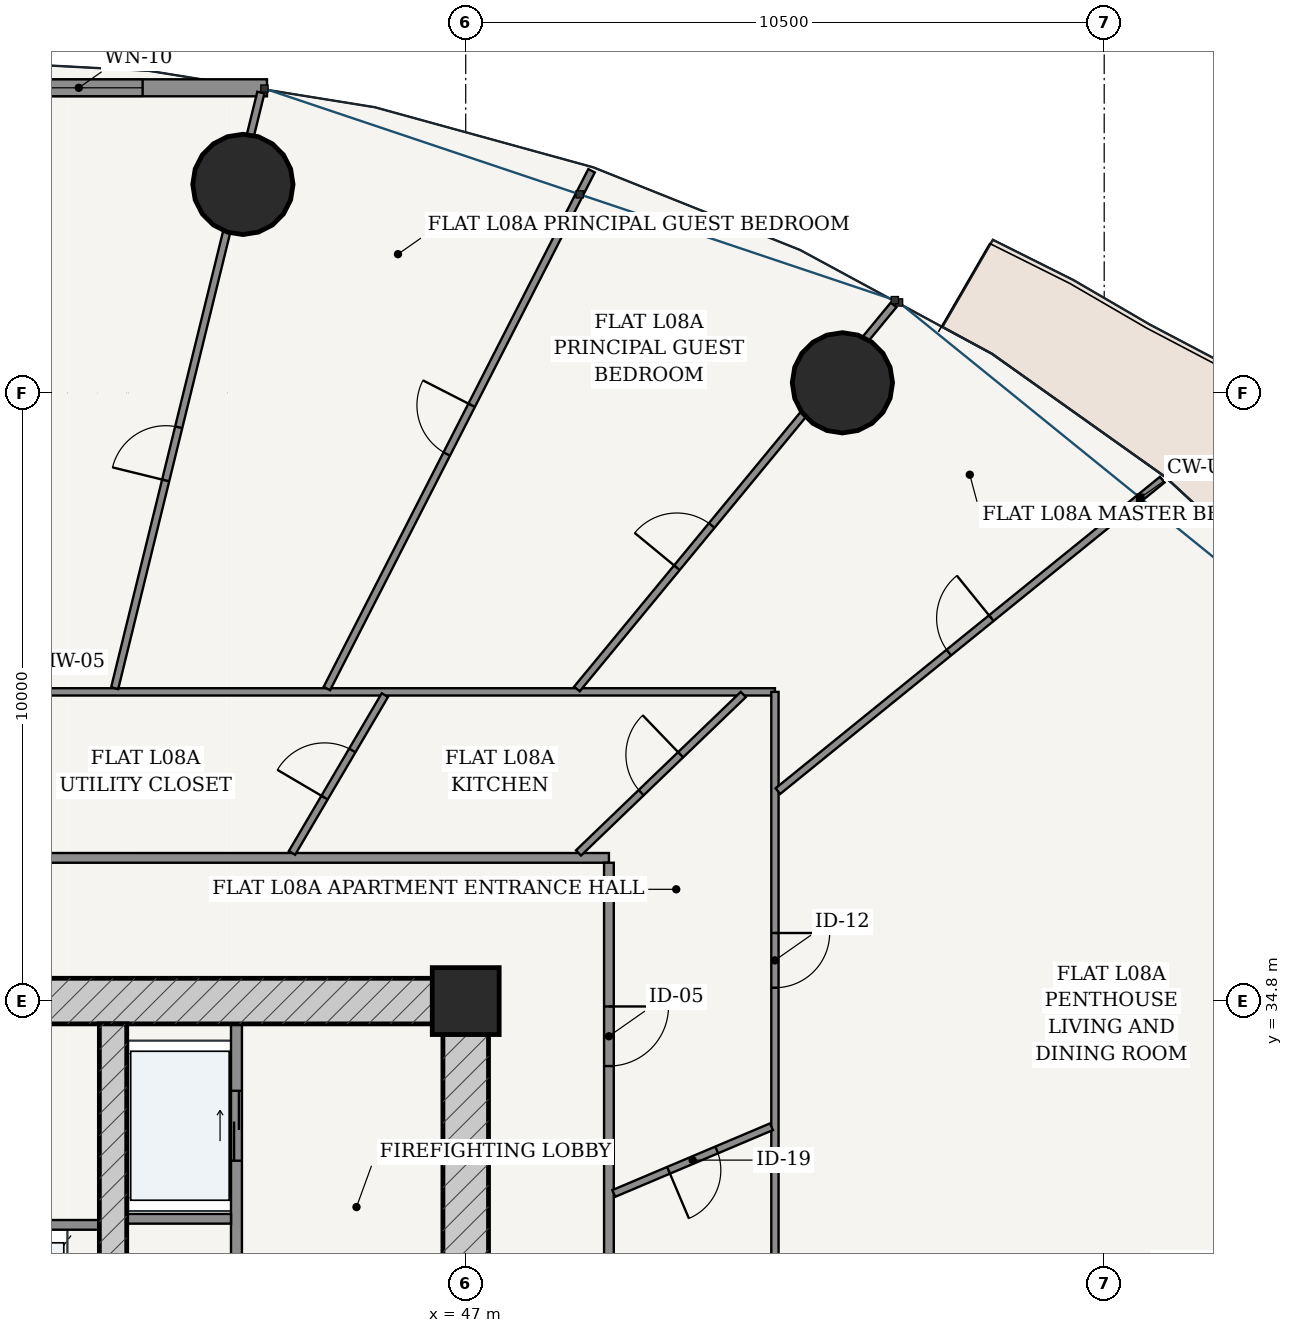
"""IFC4 building model, lengths in metres.
Left out: names, types, materials, properties, quantities, classifications, styles, units other than length and angle.
Written with IfcOpenShell. Run it as: python <this file> out.ifc"""

import sys

from ifc_helpers import new_model, si_unit, direction, frame, frame_2d, origin, origin_2d, place, context, subcontext, project, spatial, rectangle, hollow_circle, extrude, source, transform, mapped, element, fill, save


model = new_model("IFC4")
c1 = context("Model", 3, precision=1e-05, world=origin(), true_north=direction((-0.2419218956, 0.970295726276)))
c2 = subcontext(c1, "Body", "Model", "MODEL_VIEW")
j1 = project(units=[si_unit("LENGTHUNIT", "METRE"), si_unit("PLANEANGLEUNIT", "RADIAN")], contexts=[c1])
p1 = place(None, origin())
s1 = spatial("IfcSite", under=j1, at=p1, CompositionType="ELEMENT")
p2 = place(p1, origin())
s2 = spatial("IfcBuilding", under=s1, at=p2, CompositionType="ELEMENT")
p3 = place(p2, frame((0.0, 0.0, 34.8)))
s3 = spatial("IfcBuildingStorey", under=s2, at=p3, CompositionType="ELEMENT", Elevation=34.8)
p4 = place(p3, frame((47.0, 34.8, 0.0), z_axis=(0.0, 0.0, 1.0), x_axis=(1.0, 0.0, 0.0)))
e1 = element("IfcColumn", 1, at=p4, inside=s3, PredefinedType="COLUMN", context=c2, shape_type="SweptSolid", body=[
    extrude(rectangle(XDim=1.1, YDim=1.1, at=origin_2d()), origin(), (0.0, 0.0, 1.0), 3.6),
])
p5 = place(p3, frame((28.625, 34.8, 0.0), z_axis=(0.0, 0.0, 1.0), x_axis=(1.0, 0.0, 0.0)))
e2 = element("IfcWall", 2, at=p5, inside=s3, PredefinedType="SHEAR", context=c2, shape_type="SweptSolid", body=[
    extrude(rectangle(XDim=18.75, YDim=0.75, at=frame_2d((9.375, 0.0))), origin(), (0.0, 0.0, 1.0), 3.32),
])
p6 = place(p5, frame((7.407, 0.0, 0.0)))
e3 = element("IfcOpeningElement", 3, at=p6, cuts=e2, PredefinedType="OPENING", context=c2, shape_type="SweptSolid", body=[
    extrude(rectangle(XDim=0.86, YDim=2.1, at=frame_2d((0.43, 1.05))), frame((0.0, 0.385, 0.0), z_axis=(0.0, -1.0, 0.0), x_axis=(1.0, 0.0, 0.0)), (0.0, 0.0, 1.0), 0.77),
])
p7 = place(p5, frame((10.488, 0.0, 0.0)))
e4 = element("IfcOpeningElement", 4, at=p7, cuts=e2, PredefinedType="OPENING", context=c2, shape_type="SweptSolid", body=[
    extrude(rectangle(XDim=0.85, YDim=2.1, at=frame_2d((0.425, 1.05))), frame((0.0, 0.385, 0.0), z_axis=(0.0, -1.0, 0.0), x_axis=(1.0, 0.0, 0.0)), (0.0, 0.0, 1.0), 0.77),
])
p8 = place(p3, frame((47.0, 19.175, 0.0), z_axis=(0.0, 0.0, 1.0), x_axis=(0.0, 1.0, 0.0)))
e5 = element("IfcWall", 5, at=p8, inside=s3, PredefinedType="SHEAR", context=c2, shape_type="SweptSolid", body=[
    extrude(rectangle(XDim=15.25, YDim=0.75, at=frame_2d((7.625, 0.0))), origin(), (0.0, 0.0, 1.0), 3.32),
])
p9 = place(p8, frame((9.875, 0.0, 0.0)))
e6 = element("IfcOpeningElement", 6, at=p9, cuts=e5, PredefinedType="OPENING", context=c2, shape_type="SweptSolid", body=[
    extrude(rectangle(XDim=1.5, YDim=2.2, at=frame_2d((0.75, 1.1))), frame((0.0, 0.385, 0.0), z_axis=(0.0, -1.0, 0.0), x_axis=(1.0, 0.0, 0.0)), (0.0, 0.0, 1.0), 0.77),
])
p10 = place(p3, frame((41.2, 19.175, 0.0), z_axis=(0.0, 0.0, 1.0), x_axis=(0.0, 1.0, 0.0)))
e7 = element("IfcWall", 7, at=p10, inside=s3, PredefinedType="SHEAR", context=c2, shape_type="SweptSolid", body=[
    extrude(rectangle(XDim=15.25, YDim=0.45, at=frame_2d((7.625, 0.0))), origin(), (0.0, 0.0, 1.0), 3.32),
])
p11 = place(p10, frame((7.8, 0.0, 0.0)))
e8 = element("IfcOpeningElement", 8, at=p11, cuts=e7, PredefinedType="OPENING", context=c2, shape_type="SweptSolid", body=[
    extrude(rectangle(XDim=1.05, YDim=2.15, at=frame_2d((0.525, 1.075))), frame((0.0, 0.235, 0.0), z_axis=(0.0, -1.0, 0.0), x_axis=(1.0, 0.0, 0.0)), (0.0, 0.0, 1.0), 0.47),
])
for number, where, z_axis, x_axis in (
    (9, (53.195, 44.968, 0.0), (0.0, 0.0, 1.0), (1.0, 0.0, 0.0)),
    (10, (43.336, 48.23, 0.0), (0.0, 0.0, 1.0), (1.0, 0.0, 0.0)),
):
    element("IfcColumn", number, at=place(p3, frame(where, z_axis=z_axis, x_axis=x_axis)), inside=s3, PredefinedType="COLUMN", context=c2, shape_type="SweptSolid", body=[
        extrude(hollow_circle(Radius=0.825, WallThickness=0.05, at=origin_2d()), origin(), (0.0, 0.0, 1.0), 3.6),
    ])
p12 = place(p3, frame((43.732, 49.819, 0.0), z_axis=(0.0, 0.0, 1.0), x_axis=(-1.0, 0.0, 0.0)))
e11 = element("IfcWall", 11, at=p12, inside=s3, PredefinedType="SOLIDWALL", context=c2, shape_type="SweptSolid", body=[
    extrude(rectangle(XDim=11.463, YDim=0.28, at=frame_2d((5.732, 0.0))), origin(), (0.0, 0.0, 1.0), 3.32),
])
p13 = place(p12, frame((2.045, 0.0, 0.85)))
e12 = element("IfcOpeningElement", 12, at=p13, cuts=e11, PredefinedType="OPENING", context=c2, shape_type="SweptSolid", body=[
    extrude(rectangle(XDim=2.1, YDim=1.95, at=frame_2d((1.05, 0.975))), frame((0.0, 0.15, 0.0), z_axis=(0.0, -1.0, 0.0), x_axis=(1.0, 0.0, 0.0)), (0.0, 0.0, 1.0), 0.3),
])
p14 = place(p12, frame((7.318, 0.0, 0.85)))
e13 = element("IfcOpeningElement", 13, at=p14, cuts=e11, PredefinedType="OPENING", context=c2, shape_type="SweptSolid", body=[
    extrude(rectangle(XDim=2.1, YDim=1.95, at=frame_2d((1.05, 0.975))), frame((0.0, 0.15, 0.0), z_axis=(0.0, -1.0, 0.0), x_axis=(1.0, 0.0, 0.0)), (0.0, 0.0, 1.0), 0.3),
])
p15 = place(p3, frame((43.23, 28.52, 0.0), z_axis=(0.0, 0.0, 1.0), x_axis=(0.0, 1.0, 0.0)))
e14 = element("IfcWall", 14, at=p15, inside=s3, PredefinedType="PARTITIONING", context=c2, shape_type="SweptSolid", body=[
    extrude(rectangle(XDim=5.905, YDim=0.18, at=frame_2d((2.953, 0.0))), origin(), (0.0, 0.0, 1.0), 3.32),
])
p16 = place(p15, frame((0.905, 0.0, 0.0)))
e15 = element("IfcOpeningElement", 15, at=p16, cuts=e14, PredefinedType="OPENING", context=c2, shape_type="SweptSolid", body=[
    extrude(rectangle(XDim=0.85, YDim=2.1, at=frame_2d((0.425, 1.05))), frame((0.0, 0.1, 0.0), z_axis=(0.0, -1.0, 0.0), x_axis=(1.0, 0.0, 0.0)), (0.0, 0.0, 1.0), 0.2),
])
p17 = place(p15, frame((3.655, 0.0, 0.0)))
e16 = element("IfcOpeningElement", 16, at=p17, cuts=e14, PredefinedType="OPENING", context=c2, shape_type="SweptSolid", body=[
    extrude(rectangle(XDim=1.15, YDim=2.2, at=frame_2d((0.575, 1.1))), frame((0.0, 0.1, 0.0), z_axis=(0.0, -1.0, 0.0), x_axis=(1.0, 0.0, 0.0)), (0.0, 0.0, 1.0), 0.2),
])
p18 = place(p3, frame((41.425, 31.22, 0.0), z_axis=(0.0, 0.0, 1.0), x_axis=(1.0, 0.0, 0.0)))
e17 = element("IfcWall", 17, at=p18, inside=s3, PredefinedType="PARTITIONING", context=c2, shape_type="SweptSolid", body=[
    extrude(rectangle(XDim=1.715, YDim=0.16, at=frame_2d((0.857, 0.0))), origin(), (0.0, 0.0, 1.0), 3.32),
])
p19 = place(p3, frame((35.025, 31.12, 0.0), z_axis=(0.0, 0.0, 1.0), x_axis=(1.0, 0.0, 0.0)))
e18 = element("IfcWall", 18, at=p19, inside=s3, PredefinedType="PARTITIONING", context=c2, shape_type="SweptSolid", body=[
    extrude(rectangle(XDim=5.95, YDim=0.16, at=frame_2d((2.975, 0.0))), origin(), (0.0, 0.0, 1.0), 3.32),
])
p20 = place(p3, frame((26.645, 37.155, 0.0), z_axis=(0.0, 0.0, 1.0), x_axis=(1.0, 0.0, 0.0)))
e19 = element("IfcWall", 19, at=p20, inside=s3, PredefinedType="PARTITIONING", context=c2, shape_type="SweptSolid", body=[
    extrude(rectangle(XDim=22.71, YDim=0.16, at=frame_2d((11.355, 0.0))), origin(), (0.0, 0.0, 1.0), 2.688),
])
p21 = place(p3, frame((49.355, 16.525, 0.0), z_axis=(0.0, 0.0, 1.0), x_axis=(0.0, 1.0, 0.0)))
e20 = element("IfcWall", 20, at=p21, inside=s3, PredefinedType="PARTITIONING", context=c2, shape_type="SweptSolid", body=[
    extrude(rectangle(XDim=20.55, YDim=0.16, at=frame_2d((10.275, 0.0))), origin(), (0.0, 0.0, 1.0), 2.688),
])
p22 = place(p21, frame((17.207, 0.0, 0.0)))
e21 = element("IfcOpeningElement", 21, at=p22, cuts=e20, PredefinedType="OPENING", context=c2, shape_type="SweptSolid", body=[
    extrude(rectangle(XDim=0.98, YDim=2.2, at=frame_2d((0.49, 1.1))), frame((0.0, 0.09, 0.0), z_axis=(0.0, -1.0, 0.0), x_axis=(1.0, 0.0, 0.0)), (0.0, 0.0, 1.0), 0.18),
])
p23 = place(p21, frame((1.892, 0.0, 0.0)))
e22 = element("IfcOpeningElement", 22, at=p23, cuts=e20, PredefinedType="OPENING", context=c2, shape_type="SweptSolid", body=[
    extrude(rectangle(XDim=0.98, YDim=2.2, at=frame_2d((0.49, 1.1))), frame((0.0, 0.09, 0.0), z_axis=(0.0, -1.0, 0.0), x_axis=(1.0, 0.0, 0.0)), (0.0, 0.0, 1.0), 0.18),
])
p24 = place(p3, frame((49.435, 28.643, 0.0), z_axis=(0.0, 0.0, 1.0), x_axis=(0.987255953651, 0.159140447344, 0.0)))
e23 = element("IfcWall", 23, at=p24, inside=s3, PredefinedType="PARTITIONING", context=c2, shape_type="SweptSolid", body=[
    extrude(rectangle(XDim=17.105, YDim=0.2, at=frame_2d((8.553, 0.0))), origin(), (0.0, 0.0, 1.0), 2.688),
])
p25 = place(p3, frame((27.312, 39.885, 0.0), z_axis=(0.0, 0.0, 1.0), x_axis=(1.0, 0.0, 0.0)))
e24 = element("IfcWall", 24, at=p25, inside=s3, PredefinedType="PARTITIONING", context=c2, shape_type="SweptSolid", body=[
    extrude(rectangle(XDim=24.772, YDim=0.12, at=frame_2d((12.386, 0.0))), origin(), (0.0, 0.0, 1.0), 2.688),
])
p26 = place(p3, frame((52.085, 39.885, 0.0), z_axis=(0.0, 0.0, 1.0), x_axis=(0.0, -1.0, 0.0)))
e25 = element("IfcWall", 25, at=p26, inside=s3, PredefinedType="PARTITIONING", context=c2, shape_type="SweptSolid", body=[
    extrude(rectangle(XDim=10.713, YDim=0.12, at=frame_2d((5.356, 0.0))), origin(), (0.0, 0.0, 1.0), 2.688),
])
p27 = place(p26, frame((3.965, 0.0, 0.0)))
e26 = element("IfcOpeningElement", 26, at=p27, cuts=e25, PredefinedType="OPENING", context=c2, shape_type="SweptSolid", body=[
    extrude(rectangle(XDim=0.9, YDim=2.15, at=frame_2d((0.45, 1.075))), frame((0.0, 0.07, 0.0), z_axis=(0.0, -1.0, 0.0), x_axis=(1.0, 0.0, 0.0)), (0.0, 0.0, 1.0), 0.14),
])
p28 = place(p3, frame((52.133, 38.253, 0.0), z_axis=(0.0, 0.0, 1.0), x_axis=(0.776936623447, 0.629578814087, 0.0)))
e27 = element("IfcWall", 27, at=p28, inside=s3, PredefinedType="PARTITIONING", context=c2, shape_type="SweptSolid", body=[
    extrude(rectangle(XDim=8.136, YDim=0.12, at=frame_2d((4.068, 0.0))), origin(), (0.0, 0.0, 1.0), 2.762),
])
p29 = place(p28, frame((3.618, 0.0, 0.0)))
e28 = element("IfcOpeningElement", 28, at=p29, cuts=e27, PredefinedType="OPENING", context=c2, shape_type="SweptSolid", body=[
    extrude(rectangle(XDim=0.9, YDim=2.15, at=frame_2d((0.45, 1.075))), frame((0.0, 0.07, 0.0), z_axis=(0.0, -1.0, 0.0), x_axis=(1.0, 0.0, 0.0)), (0.0, 0.0, 1.0), 0.14),
])
p30 = place(p3, frame((48.829, 39.933, 0.0), z_axis=(0.0, 0.0, 1.0), x_axis=(0.636192172227, 0.771530634516, 0.0)))
e29 = element("IfcWall", 29, at=p30, inside=s3, PredefinedType="PARTITIONING", context=c2, shape_type="SweptSolid", body=[
    extrude(rectangle(XDim=8.186, YDim=0.12, at=frame_2d((4.093, 0.0))), origin(), (0.0, 0.0, 1.0), 2.688),
])
p31 = place(p30, frame((2.584, 0.0, 0.0)))
e30 = element("IfcOpeningElement", 30, at=p31, cuts=e29, PredefinedType="OPENING", context=c2, shape_type="SweptSolid", body=[
    extrude(rectangle(XDim=0.9, YDim=2.15, at=frame_2d((0.45, 1.075))), frame((0.0, 0.07, 0.0), z_axis=(0.0, -1.0, 0.0), x_axis=(1.0, 0.0, 0.0)), (0.0, 0.0, 1.0), 0.14),
])
p32 = place(p3, frame((44.717, 39.94, 0.0), z_axis=(0.0, 0.0, 1.0), x_axis=(0.455131303234, 0.890424335256, 0.0)))
e31 = element("IfcWall", 31, at=p32, inside=s3, PredefinedType="PARTITIONING", context=c2, shape_type="SweptSolid", body=[
    extrude(rectangle(XDim=9.562, YDim=0.12, at=frame_2d((4.781, 0.0))), origin(), (0.0, 0.0, 1.0), 2.762),
])
p33 = place(p32, frame((4.331, 0.0, 0.0)))
e32 = element("IfcOpeningElement", 32, at=p33, cuts=e31, PredefinedType="OPENING", context=c2, shape_type="SweptSolid", body=[
    extrude(rectangle(XDim=0.9, YDim=2.15, at=frame_2d((0.45, 1.075))), frame((0.0, 0.07, 0.0), z_axis=(0.0, -1.0, 0.0), x_axis=(1.0, 0.0, 0.0)), (0.0, 0.0, 1.0), 0.14),
])
p34 = place(p3, frame((41.227, 39.945, 0.0), z_axis=(0.0, 0.0, 1.0), x_axis=(0.238375747469, 0.97117300365, 0.0)))
e33 = element("IfcWall", 33, at=p34, inside=s3, PredefinedType="PARTITIONING", context=c2, shape_type="SweptSolid", body=[
    extrude(rectangle(XDim=10.086, YDim=0.12, at=frame_2d((5.043, 0.0))), origin(), (0.0, 0.0, 1.0), 2.688),
])
p35 = place(p34, frame((3.519, 0.0, 0.0)))
e34 = element("IfcOpeningElement", 34, at=p35, cuts=e33, PredefinedType="OPENING", context=c2, shape_type="SweptSolid", body=[
    extrude(rectangle(XDim=0.9, YDim=2.15, at=frame_2d((0.45, 1.075))), frame((0.0, 0.07, 0.0), z_axis=(0.0, -1.0, 0.0), x_axis=(1.0, 0.0, 0.0)), (0.0, 0.0, 1.0), 0.14),
])
p36 = place(p3, frame((49.435, 31.636, 0.0), z_axis=(0.0, 0.0, 1.0), x_axis=(0.920969644836, 0.389634332792, 0.0)))
e35 = element("IfcWall", 35, at=p36, inside=s3, PredefinedType="PARTITIONING", context=c2, shape_type="SweptSolid", body=[
    extrude(rectangle(XDim=2.815, YDim=0.12, at=frame_2d((1.408, 0.0))), origin(), (0.0, 0.0, 1.0), 3.32),
])
p37 = place(p36, frame((0.978, 0.0, 0.0)))
e36 = element("IfcOpeningElement", 36, at=p37, cuts=e35, PredefinedType="OPENING", context=c2, shape_type="SweptSolid", body=[
    extrude(rectangle(XDim=0.86, YDim=2.15, at=frame_2d((0.43, 1.075))), frame((0.0, 0.07, 0.0), z_axis=(0.0, -1.0, 0.0), x_axis=(1.0, 0.0, 0.0)), (0.0, 0.0, 1.0), 0.14),
])
p38 = place(p3, frame((48.855, 37.236, 0.0), z_axis=(0.0, 0.0, 1.0), x_axis=(0.720835560675, 0.693106120638, 0.0)))
e37 = element("IfcWall", 37, at=p38, inside=s3, PredefinedType="PARTITIONING", context=c2, shape_type="SweptSolid", body=[
    extrude(rectangle(XDim=3.76, YDim=0.12, at=frame_2d((1.88, 0.0))), origin(), (0.0, 0.0, 1.0), 2.999),
])
p39 = place(p38, frame((1.43, 0.0, 0.0)))
e38 = element("IfcOpeningElement", 38, at=p39, cuts=e37, PredefinedType="OPENING", context=c2, shape_type="SweptSolid", body=[
    extrude(rectangle(XDim=0.9, YDim=2.15, at=frame_2d((0.45, 1.075))), frame((0.0, 0.07, 0.0), z_axis=(0.0, -1.0, 0.0), x_axis=(1.0, 0.0, 0.0)), (0.0, 0.0, 1.0), 0.14),
])
p40 = place(p3, frame((44.143, 37.237, 0.0), z_axis=(0.0, 0.0, 1.0), x_axis=(0.507275244465, 0.861784094976, 0.0)))
e39 = element("IfcWall", 39, at=p40, inside=s3, PredefinedType="PARTITIONING", context=c2, shape_type="SweptSolid", body=[
    extrude(rectangle(XDim=3.011, YDim=0.12, at=frame_2d((1.505, 0.0))), origin(), (0.0, 0.0, 1.0), 3.32),
])
p41 = place(p40, frame((1.055, 0.0, 0.0)))
e40 = element("IfcOpeningElement", 40, at=p41, cuts=e39, PredefinedType="OPENING", context=c2, shape_type="SweptSolid", body=[
    extrude(rectangle(XDim=0.9, YDim=2.15, at=frame_2d((0.45, 1.075))), frame((0.0, 0.07, 0.0), z_axis=(0.0, -1.0, 0.0), x_axis=(1.0, 0.0, 0.0)), (0.0, 0.0, 1.0), 0.14),
])
m1 = source(origin(), c2, "Body", "SweptSolid", [
    extrude(rectangle(XDim=2.1, YDim=1.95, at=frame_2d((1.05, 0.975))), frame((0.0, 0.03, 0.0), z_axis=(0.0, -1.0, 0.0), x_axis=(1.0, 0.0, 0.0)), (0.0, 0.0, 1.0), 0.06),
])
p42 = place(p13, origin())
e41 = element("IfcWindow", 41, at=p42, inside=s3, PartitioningType="SINGLE_PANEL", PredefinedType="WINDOW", context=c2, shape_type="MappedRepresentation", body=[
    mapped(m1, transform((0.0, 0.0, 0.0), scale=1.0)),
])
fill(e12, e41)
m2 = source(origin(), c2, "Body", "SweptSolid", [
    extrude(rectangle(XDim=1.15, YDim=2.2, at=frame_2d((0.575, 1.1))), frame((0.0, 0.025, 0.0), z_axis=(0.0, -1.0, 0.0), x_axis=(1.0, 0.0, 0.0)), (0.0, 0.0, 1.0), 0.05),
])
p43 = place(p17, origin())
e42 = element("IfcDoor", 42, at=p43, inside=s3, OperationType="DOUBLE_DOOR_SLIDING", PredefinedType="DOOR", context=c2, shape_type="MappedRepresentation", body=[
    mapped(m2, transform((0.0, 0.0, 0.0), scale=1.0)),
])
fill(e16, e42)
m3 = source(origin(), c2, "Body", "SweptSolid", [
    extrude(rectangle(XDim=0.98, YDim=2.2, at=frame_2d((0.49, 1.1))), frame((0.0, 0.025, 0.0), z_axis=(0.0, -1.0, 0.0), x_axis=(1.0, 0.0, 0.0)), (0.0, 0.0, 1.0), 0.05),
])
p44 = place(p22, frame((0.98, 0.0, 0.0), z_axis=(0.0, 0.0, 1.0), x_axis=(-1.0, 0.0, 0.0)))
e43 = element("IfcDoor", 43, at=p44, inside=s3, OperationType="SINGLE_SWING_LEFT", PredefinedType="DOOR", context=c2, shape_type="MappedRepresentation", body=[
    mapped(m3, transform((0.0, 0.0, 0.0), scale=1.0)),
])
fill(e21, e43)
m4 = source(origin(), c2, "Body", "SweptSolid", [
    extrude(rectangle(XDim=0.86, YDim=2.15, at=frame_2d((0.43, 1.075))), frame((0.0, 0.025, 0.0), z_axis=(0.0, -1.0, 0.0), x_axis=(1.0, 0.0, 0.0)), (0.0, 0.0, 1.0), 0.05),
])
p45 = place(p37, frame((0.86, 0.0, 0.0), z_axis=(0.0, 0.0, 1.0), x_axis=(-1.0, 0.0, 0.0)))
e44 = element("IfcDoor", 44, at=p45, inside=s3, OperationType="SINGLE_SWING_RIGHT", PredefinedType="DOOR", context=c2, shape_type="MappedRepresentation", body=[
    mapped(m4, transform((0.0, 0.0, 0.0), scale=1.0)),
])
fill(e36, e44)
m5 = source(origin(), c2, "Body", "SweptSolid", [
    extrude(rectangle(XDim=0.9, YDim=2.15, at=frame_2d((0.45, 1.075))), frame((0.0, 0.025, 0.0), z_axis=(0.0, -1.0, 0.0), x_axis=(1.0, 0.0, 0.0)), (0.0, 0.0, 1.0), 0.05),
])
p46 = place(p27, origin())
e45 = element("IfcDoor", 45, at=p46, inside=s3, OperationType="SINGLE_SWING_LEFT", PredefinedType="DOOR", context=c2, shape_type="MappedRepresentation", body=[
    mapped(m5, transform((0.0, 0.0, 0.0), scale=1.0)),
])
fill(e26, e45)
p47 = place(p39, origin())
e46 = element("IfcDoor", 46, at=p47, inside=s3, OperationType="SINGLE_SWING_RIGHT", PredefinedType="DOOR", context=c2, shape_type="MappedRepresentation", body=[
    mapped(m5, transform((0.0, 0.0, 0.0), scale=1.0)),
])
fill(e38, e46)
p48 = place(p41, origin())
e47 = element("IfcDoor", 47, at=p48, inside=s3, OperationType="SINGLE_SWING_LEFT", PredefinedType="DOOR", context=c2, shape_type="MappedRepresentation", body=[
    mapped(m5, transform((0.0, 0.0, 0.0), scale=1.0)),
])
fill(e40, e47)
p49 = place(p29, origin())
e48 = element("IfcDoor", 48, at=p49, inside=s3, OperationType="SINGLE_SWING_RIGHT", PredefinedType="DOOR", context=c2, shape_type="MappedRepresentation", body=[
    mapped(m5, transform((0.0, 0.0, 0.0), scale=1.0)),
])
fill(e28, e48)
p50 = place(p31, origin())
e49 = element("IfcDoor", 49, at=p50, inside=s3, OperationType="SINGLE_SWING_LEFT", PredefinedType="DOOR", context=c2, shape_type="MappedRepresentation", body=[
    mapped(m5, transform((0.0, 0.0, 0.0), scale=1.0)),
])
fill(e30, e49)
p51 = place(p33, origin())
e50 = element("IfcDoor", 50, at=p51, inside=s3, OperationType="SINGLE_SWING_RIGHT", PredefinedType="DOOR", context=c2, shape_type="MappedRepresentation", body=[
    mapped(m5, transform((0.0, 0.0, 0.0), scale=1.0)),
])
fill(e32, e50)
p52 = place(p35, origin())
e51 = element("IfcDoor", 51, at=p52, inside=s3, OperationType="SINGLE_SWING_LEFT", PredefinedType="DOOR", context=c2, shape_type="MappedRepresentation", body=[
    mapped(m5, transform((0.0, 0.0, 0.0), scale=1.0)),
])
fill(e34, e51)
save(model, sys.argv[1])
